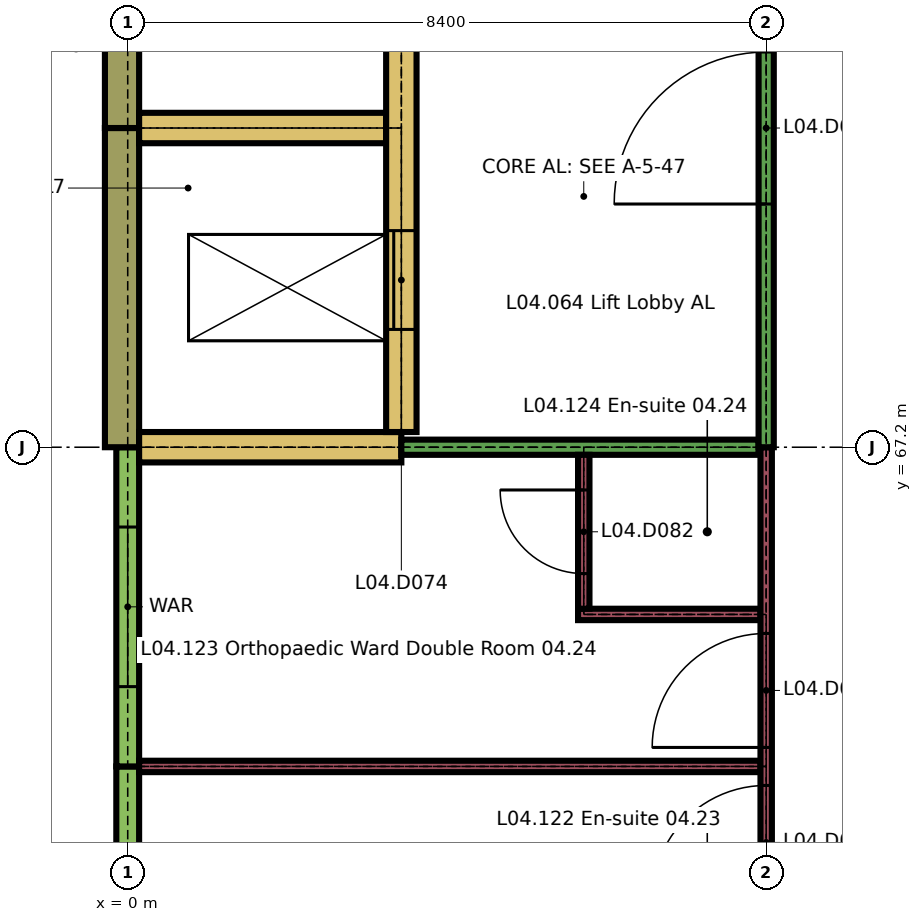
"""IFC4 building model, lengths in metres.
Left out: names, types, materials, properties, quantities, classifications, styles, units other than length and angle.
Written with IfcOpenShell. Run it as: python <this file> out.ifc"""

import sys

from ifc_helpers import new_model, si_unit, direction, frame, frame_2d, origin, place, context, subcontext, project, spatial, rectangle, extrude, element, fill, save


model = new_model("IFC4")
c1 = context("Model", 3, precision=1e-05, world=origin(), true_north=direction((0.0, 1.0)))
c2 = subcontext(c1, "Body", "Model", "MODEL_VIEW")
j1 = project(units=[si_unit("LENGTHUNIT", "METRE"), si_unit("PLANEANGLEUNIT", "RADIAN")], contexts=[c1])
p1 = place(None, origin())
s1 = spatial("IfcSite", under=j1, at=p1, CompositionType="ELEMENT")
p2 = place(p1, origin())
s2 = spatial("IfcBuilding", under=s1, at=p2, CompositionType="ELEMENT")
p3 = place(p2, frame((0.0, 0.0, 18.9)))
s3 = spatial("IfcBuildingStorey", under=s2, at=p3, CompositionType="ELEMENT", Elevation=18.9)
p4 = place(p3, frame((0.0, 59.15, 0.0), z_axis=(0.0, 0.0, 1.0), x_axis=(0.0, 1.0, 0.0)))
e1 = element("IfcWall", 1, at=p4, inside=s3, PredefinedType="SOLIDWALL", context=c2, shape_type="SweptSolid", body=[
    extrude(rectangle(XDim=3.85, YDim=0.3, at=frame_2d((1.925, 0.0))), origin(), (0.0, 0.0, 1.0), 2.96),
])
p5 = place(p4, frame((0.7, 0.0, 0.9)))
e2 = element("IfcOpeningElement", 2, at=p5, cuts=e1, PredefinedType="OPENING", context=c2, shape_type="SweptSolid", body=[
    extrude(rectangle(XDim=2.1, YDim=1.5, at=frame_2d((1.05, 0.75))), frame((0.0, 0.16, 0.0), z_axis=(0.0, -1.0, 0.0), x_axis=(1.0, 0.0, 0.0)), (0.0, 0.0, 1.0), 0.32),
])
p6 = place(p3, frame((0.0, 63.0, 0.0), z_axis=(0.0, 0.0, 1.0), x_axis=(0.0, 1.0, 0.0)))
e3 = element("IfcWall", 3, at=p6, inside=s3, PredefinedType="SOLIDWALL", context=c2, shape_type="SweptSolid", body=[
    extrude(rectangle(XDim=4.2, YDim=0.3, at=frame_2d((2.1, 0.0))), origin(), (0.0, 0.0, 1.0), 2.96),
])
p7 = place(p6, frame((1.05, 0.0, 0.9)))
e4 = element("IfcOpeningElement", 4, at=p7, cuts=e3, PredefinedType="OPENING", context=c2, shape_type="SweptSolid", body=[
    extrude(rectangle(XDim=2.1, YDim=1.5, at=frame_2d((1.05, 0.75))), frame((0.0, 0.16, 0.0), z_axis=(0.0, -1.0, 0.0), x_axis=(1.0, 0.0, 0.0)), (0.0, 0.0, 1.0), 0.32),
])
p8 = place(p3, frame((-0.075, 67.2, 0.0), z_axis=(0.0, 0.0, 1.0), x_axis=(0.0, 1.0, 0.0)))
e5 = element("IfcWall", 5, at=p8, inside=s3, PredefinedType="SOLIDWALL", context=c2, shape_type="SweptSolid", body=[
    extrude(rectangle(XDim=4.2, YDim=0.45, at=frame_2d((2.1, 0.0))), origin(), (0.0, 0.0, 1.0), 3.26),
])
p9 = place(p3, frame((-0.075, 71.4, 0.0), z_axis=(0.0, 0.0, 1.0), x_axis=(0.0, 1.0, 0.0)))
e6 = element("IfcWall", 6, at=p9, inside=s3, PredefinedType="SOLIDWALL", context=c2, shape_type="SweptSolid", body=[
    extrude(rectangle(XDim=4.2, YDim=0.45, at=frame_2d((2.1, 0.0))), origin(), (0.0, 0.0, 1.0), 3.26),
])
p10 = place(p3, frame((0.15, 63.0, 0.0), z_axis=(0.0, 0.0, 1.0), x_axis=(1.0, 0.0, 0.0)))
e7 = element("IfcWall", 7, at=p10, inside=s3, PredefinedType="PARTITIONING", context=c2, shape_type="SweptSolid", body=[
    extrude(rectangle(XDim=8.175, YDim=0.15, at=frame_2d((4.087, 0.0))), origin(), (0.0, 0.0, 1.0), 3.26),
])
p11 = place(p3, frame((5.925, 65.0, 0.0), z_axis=(0.0, 0.0, 1.0), x_axis=(1.0, 0.0, 0.0)))
e8 = element("IfcWall", 8, at=p11, inside=s3, PredefinedType="PARTITIONING", context=c2, shape_type="SweptSolid", body=[
    extrude(rectangle(XDim=2.4, YDim=0.15, at=frame_2d((1.2, 0.0))), origin(), (0.0, 0.0, 1.0), 3.26),
])
p12 = place(p3, frame((0.15, 67.2, 0.0), z_axis=(0.0, 0.0, 1.0), x_axis=(1.0, 0.0, 0.0)))
e9 = element("IfcWall", 9, at=p12, inside=s3, PredefinedType="SHEAR", context=c2, shape_type="SweptSolid", body=[
    extrude(rectangle(XDim=3.45, YDim=0.4, at=frame_2d((1.725, 0.0))), origin(), (0.0, 0.0, 1.0), 3.26),
])
p13 = place(p3, frame((3.6, 67.2, 0.0), z_axis=(0.0, 0.0, 1.0), x_axis=(1.0, 0.0, 0.0)))
e10 = element("IfcWall", 10, at=p13, inside=s3, PredefinedType="PARTITIONING", context=c2, shape_type="SweptSolid", body=[
    extrude(rectangle(XDim=4.7, YDim=0.2, at=frame_2d((2.35, 0.0))), origin(), (0.0, 0.0, 1.0), 3.26),
])
p14 = place(p3, frame((0.15, 71.4, 0.0), z_axis=(0.0, 0.0, 1.0), x_axis=(1.0, 0.0, 0.0)))
e11 = element("IfcWall", 11, at=p14, inside=s3, PredefinedType="SHEAR", context=c2, shape_type="SweptSolid", body=[
    extrude(rectangle(XDim=3.25, YDim=0.4, at=frame_2d((1.625, 0.0))), origin(), (0.0, 0.0, 1.0), 3.26),
])
p15 = place(p3, frame((3.6, 67.4, 0.0), z_axis=(0.0, 0.0, 1.0), x_axis=(0.0, 1.0, 0.0)))
e12 = element("IfcWall", 12, at=p15, inside=s3, PredefinedType="SHEAR", context=c2, shape_type="SweptSolid", body=[
    extrude(rectangle(XDim=8.0, YDim=0.4, at=frame_2d((4.0, 0.0))), origin(), (0.0, 0.0, 1.0), 3.26),
])
p16 = place(p15, frame((1.35, 0.0, 0.0)))
e13 = element("IfcOpeningElement", 13, at=p16, cuts=e12, PredefinedType="OPENING", context=c2, shape_type="SweptSolid", body=[
    extrude(rectangle(XDim=1.3, YDim=2.1, at=frame_2d((0.65, 1.05))), frame((0.0, 0.21, 0.0), z_axis=(0.0, -1.0, 0.0), x_axis=(1.0, 0.0, 0.0)), (0.0, 0.0, 1.0), 0.42),
])
p17 = place(p15, frame((5.45, 0.0, 0.0)))
e14 = element("IfcOpeningElement", 14, at=p17, cuts=e12, PredefinedType="OPENING", context=c2, shape_type="SweptSolid", body=[
    extrude(rectangle(XDim=1.1, YDim=2.1, at=frame_2d((0.55, 1.05))), frame((0.0, 0.21, 0.0), z_axis=(0.0, -1.0, 0.0), x_axis=(1.0, 0.0, 0.0)), (0.0, 0.0, 1.0), 0.42),
])
p18 = place(p3, frame((6.0, 65.075, 0.0), z_axis=(0.0, 0.0, 1.0), x_axis=(0.0, 1.0, 0.0)))
e15 = element("IfcWall", 15, at=p18, inside=s3, PredefinedType="PARTITIONING", context=c2, shape_type="SweptSolid", body=[
    extrude(rectangle(XDim=2.025, YDim=0.15, at=frame_2d((1.013, 0.0))), origin(), (0.0, 0.0, 1.0), 3.26),
])
p19 = place(p18, frame((0.462, 0.0, 0.0)))
e16 = element("IfcOpeningElement", 16, at=p19, cuts=e15, PredefinedType="OPENING", context=c2, shape_type="SweptSolid", body=[
    extrude(rectangle(XDim=1.1, YDim=2.1, at=frame_2d((0.55, 1.05))), frame((0.0, 0.085, 0.0), z_axis=(0.0, -1.0, 0.0), x_axis=(1.0, 0.0, 0.0)), (0.0, 0.0, 1.0), 0.17),
])
p20 = place(p3, frame((8.4, 59.15, 0.0), z_axis=(0.0, 0.0, 1.0), x_axis=(0.0, 1.0, 0.0)))
e17 = element("IfcWall", 17, at=p20, inside=s3, PredefinedType="PARTITIONING", context=c2, shape_type="SweptSolid", body=[
    extrude(rectangle(XDim=8.05, YDim=0.15, at=frame_2d((4.025, 0.0))), origin(), (0.0, 0.0, 1.0), 3.26),
])
p21 = place(p20, frame((2.1, 0.0, 0.0)))
e18 = element("IfcOpeningElement", 18, at=p21, cuts=e17, PredefinedType="OPENING", context=c2, shape_type="SweptSolid", body=[
    extrude(rectangle(XDim=1.5, YDim=2.4, at=frame_2d((0.75, 1.2))), frame((0.0, 0.085, 0.0), z_axis=(0.0, -1.0, 0.0), x_axis=(1.0, 0.0, 0.0)), (0.0, 0.0, 1.0), 0.17),
])
p22 = place(p20, frame((4.1, 0.0, 0.0)))
e19 = element("IfcOpeningElement", 19, at=p22, cuts=e17, PredefinedType="OPENING", context=c2, shape_type="SweptSolid", body=[
    extrude(rectangle(XDim=1.5, YDim=2.4, at=frame_2d((0.75, 1.2))), frame((0.0, 0.085, 0.0), z_axis=(0.0, -1.0, 0.0), x_axis=(1.0, 0.0, 0.0)), (0.0, 0.0, 1.0), 0.17),
])
p23 = place(p3, frame((8.4, 67.2, 0.0), z_axis=(0.0, 0.0, 1.0), x_axis=(0.0, 1.0, 0.0)))
e20 = element("IfcWall", 20, at=p23, inside=s3, PredefinedType="PARTITIONING", context=c2, shape_type="SweptSolid", body=[
    extrude(rectangle(XDim=8.4, YDim=0.2, at=frame_2d((4.2, 0.0))), origin(), (0.0, 0.0, 1.0), 3.26),
])
p24 = place(p23, frame((3.2, 0.0, 0.0)))
e21 = element("IfcOpeningElement", 21, at=p24, cuts=e20, PredefinedType="OPENING", context=c2, shape_type="SweptSolid", body=[
    extrude(rectangle(XDim=2.0, YDim=2.4, at=frame_2d((1.0, 1.2))), frame((0.0, 0.11, 0.0), z_axis=(0.0, -1.0, 0.0), x_axis=(1.0, 0.0, 0.0)), (0.0, 0.0, 1.0), 0.22),
])
p25 = place(p7, origin())
e22 = element("IfcWindow", 22, at=p25, inside=s3, PartitioningType="DOUBLE_PANEL_VERTICAL", PredefinedType="WINDOW", context=c2, shape_type="SweptSolid", body=[
    extrude(rectangle(XDim=2.1, YDim=1.5, at=frame_2d((1.05, 0.75))), frame((0.0, 0.05, 0.0), z_axis=(0.0, -1.0, 0.0), x_axis=(1.0, 0.0, 0.0)), (0.0, 0.0, 1.0), 0.1),
])
fill(e4, e22)
p26 = place(p16, origin())
e23 = element("IfcDoor", 23, at=p26, inside=s3, OperationType="SLIDING_TO_LEFT", PredefinedType="DOOR", context=c2, shape_type="SweptSolid", body=[
    extrude(rectangle(XDim=1.3, YDim=2.1, at=frame_2d((0.65, 1.05))), frame((0.0, 0.025, 0.0), z_axis=(0.0, -1.0, 0.0), x_axis=(1.0, 0.0, 0.0)), (0.0, 0.0, 1.0), 0.05),
])
fill(e13, e23)
p27 = place(p19, origin())
e24 = element("IfcDoor", 24, at=p27, inside=s3, OperationType="SINGLE_SWING_LEFT", PredefinedType="DOOR", context=c2, shape_type="SweptSolid", body=[
    extrude(rectangle(XDim=1.1, YDim=2.1, at=frame_2d((0.55, 1.05))), frame((0.0, 0.025, 0.0), z_axis=(0.0, -1.0, 0.0), x_axis=(1.0, 0.0, 0.0)), (0.0, 0.0, 1.0), 0.05),
])
fill(e16, e24)
p28 = place(p21, origin())
e25 = element("IfcDoor", 25, at=p28, inside=s3, OperationType="SINGLE_SWING_RIGHT", PredefinedType="DOOR", context=c2, shape_type="SweptSolid", body=[
    extrude(rectangle(XDim=1.5, YDim=2.4, at=frame_2d((0.75, 1.2))), frame((0.0, 0.03, 0.0), z_axis=(0.0, -1.0, 0.0), x_axis=(1.0, 0.0, 0.0)), (0.0, 0.0, 1.0), 0.06),
])
fill(e18, e25)
p29 = place(p22, origin())
e26 = element("IfcDoor", 26, at=p29, inside=s3, OperationType="SINGLE_SWING_RIGHT", PredefinedType="DOOR", context=c2, shape_type="SweptSolid", body=[
    extrude(rectangle(XDim=1.5, YDim=2.4, at=frame_2d((0.75, 1.2))), frame((0.0, 0.03, 0.0), z_axis=(0.0, -1.0, 0.0), x_axis=(1.0, 0.0, 0.0)), (0.0, 0.0, 1.0), 0.06),
])
fill(e19, e26)
p30 = place(p24, origin())
e27 = element("IfcDoor", 27, at=p30, inside=s3, OperationType="SINGLE_SWING_RIGHT", PredefinedType="DOOR", context=c2, shape_type="SweptSolid", body=[
    extrude(rectangle(XDim=2.0, YDim=2.4, at=frame_2d((1.0, 1.2))), frame((0.0, 0.03, 0.0), z_axis=(0.0, -1.0, 0.0), x_axis=(1.0, 0.0, 0.0)), (0.0, 0.0, 1.0), 0.06),
])
fill(e21, e27)
save(model, sys.argv[1])
